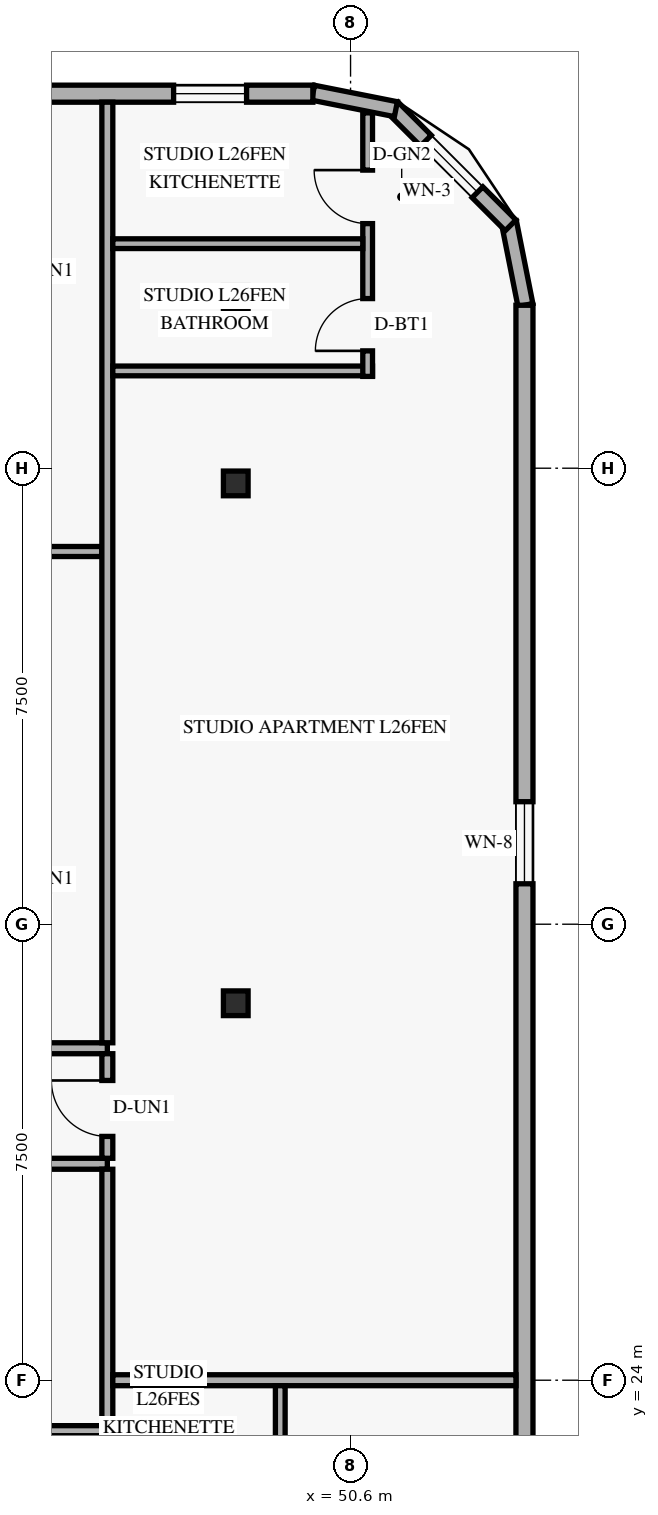
"""IFC4 building model, lengths in metres.
Left out: names, types, materials, properties, quantities, classifications, styles, units other than length and angle.
Written with IfcOpenShell. Run it as: python <this file> out.ifc"""

import sys

from ifc_helpers import new_model, si_unit, direction, frame, frame_2d, origin, origin_2d, place, context, subcontext, project, spatial, rectangle, hollow_rectangle, extrude, element, fill, save


model = new_model("IFC4")
c1 = context("Model", 3, precision=1e-05, world=origin(), true_north=direction((0.0, 1.0)))
c2 = subcontext(c1, "Body", "Model", "MODEL_VIEW")
j1 = project(units=[si_unit("LENGTHUNIT", "METRE"), si_unit("PLANEANGLEUNIT", "RADIAN")], contexts=[c1])
p1 = place(None, origin())
s1 = spatial("IfcSite", under=j1, at=p1, CompositionType="ELEMENT")
p2 = place(p1, origin())
s2 = spatial("IfcBuilding", under=s1, at=p2, CompositionType="ELEMENT")
p3 = place(p2, frame((0.0, 0.0, 102.6)))
s3 = spatial("IfcBuildingStorey", under=s2, at=p3, CompositionType="ELEMENT", Elevation=102.6)
for number, where, z_axis, x_axis in (
    (1, (48.608, 30.2, 0.0), (0.058, 0.0, 0.998), (0.0, 1.0, 0.0)),
    (2, (48.608, 38.75, 0.0), (0.058, 0.0, 0.998), (0.0, 1.0, 0.0)),
    (3, (48.608, 41.8, 0.0), (0.058, 0.0, 0.998), (0.0, 1.0, 0.0)),
):
    element("IfcColumn", number, at=place(p3, frame(where, z_axis=z_axis, x_axis=x_axis)), inside=s3, PredefinedType="COLUMN", context=c2, shape_type="SweptSolid", body=[
        extrude(hollow_rectangle(XDim=0.406, YDim=0.406, WallThickness=0.016, at=origin_2d()), origin(), (0.0, 0.0, 1.0), 3.606),
    ])
p4 = place(p3, frame((53.476, 41.684, 0.0), z_axis=(0.0, 0.0, 1.0), x_axis=(-0.195000137217, 0.980803214965, 0.0)))
e4 = element("IfcWall", 4, at=p4, inside=s3, PredefinedType="SOLIDWALL", context=c2, shape_type="SweptSolid", body=[
    extrude(rectangle(XDim=1.388, YDim=0.25, at=frame_2d((0.694, 0.0))), origin(), (0.0, 0.0, 1.0), 3.36),
])
p5 = place(p3, frame((53.232, 42.995, 0.0), z_axis=(0.0, 0.0, 1.0), x_axis=(-0.707151344399, 0.707062215165, 0.0)))
e5 = element("IfcWall", 5, at=p5, inside=s3, PredefinedType="SOLIDWALL", context=c2, shape_type="SweptSolid", body=[
    extrude(rectangle(XDim=2.739, YDim=0.25, at=frame_2d((1.37, 0.0))), origin(), (0.0, 0.0, 1.0), 3.36),
])
p6 = place(p5, frame((0.77, 0.0, 0.85)))
e6 = element("IfcOpeningElement", 6, at=p6, cuts=e5, PredefinedType="OPENING", context=c2, shape_type="SweptSolid", body=[
    extrude(rectangle(XDim=1.2, YDim=1.5, at=frame_2d((0.6, 0.75))), frame((0.0, 0.135, 0.0), z_axis=(0.0, -1.0, 0.0), x_axis=(1.0, 0.0, 0.0)), (0.0, 0.0, 1.0), 0.27),
])
p7 = place(p3, frame((51.345, 44.905, 0.0), z_axis=(0.0, 0.0, 1.0), x_axis=(-0.980809899341, 0.19496651342, 0.0)))
e7 = element("IfcWall", 7, at=p7, inside=s3, PredefinedType="SOLIDWALL", context=c2, shape_type="SweptSolid", body=[
    extrude(rectangle(XDim=1.389, YDim=0.25, at=frame_2d((0.694, 0.0))), origin(), (0.0, 0.0, 1.0), 3.36),
])
p8 = place(p3, frame((53.46, 6.32, 0.0), z_axis=(0.0, 0.0, 1.0), x_axis=(0.0, 1.0, 0.0)))
e8 = element("IfcWall", 8, at=p8, inside=s3, PredefinedType="SOLIDWALL", context=c2, shape_type="SweptSolid", body=[
    extrude(rectangle(XDim=35.36, YDim=0.28, at=frame_2d((17.68, 0.0))), origin(), (0.0, 0.0, 1.0), 3.36),
])
p9 = place(p8, frame((8.165, 0.0, 0.85)))
e9 = element("IfcOpeningElement", 9, at=p9, cuts=e8, PredefinedType="OPENING", context=c2, shape_type="SweptSolid", body=[
    extrude(rectangle(XDim=1.35, YDim=1.55, at=frame_2d((0.675, 0.775))), frame((0.0, 0.15, 0.0), z_axis=(0.0, -1.0, 0.0), x_axis=(1.0, 0.0, 0.0)), (0.0, 0.0, 1.0), 0.3),
])
p10 = place(p8, frame((25.845, 0.0, 0.85)))
e10 = element("IfcOpeningElement", 10, at=p10, cuts=e8, PredefinedType="OPENING", context=c2, shape_type="SweptSolid", body=[
    extrude(rectangle(XDim=1.35, YDim=1.55, at=frame_2d((0.675, 0.775))), frame((0.0, 0.15, 0.0), z_axis=(0.0, -1.0, 0.0), x_axis=(1.0, 0.0, 0.0)), (0.0, 0.0, 1.0), 0.3),
])
p11 = place(p3, frame((49.98, 45.16, 0.0), z_axis=(0.0, 0.0, 1.0), x_axis=(-1.0, 0.0, 0.0)))
e11 = element("IfcWall", 11, at=p11, inside=s3, PredefinedType="SOLIDWALL", context=c2, shape_type="SweptSolid", body=[
    extrude(rectangle(XDim=36.56, YDim=0.28, at=frame_2d((18.28, 0.0))), origin(), (0.0, 0.0, 1.0), 3.36),
])
p12 = place(p11, frame((31.845, 0.0, 0.85)))
e12 = element("IfcOpeningElement", 12, at=p12, cuts=e11, PredefinedType="OPENING", context=c2, shape_type="SweptSolid", body=[
    extrude(rectangle(XDim=1.2, YDim=1.5, at=frame_2d((0.6, 0.75))), frame((0.0, 0.15, 0.0), z_axis=(0.0, -1.0, 0.0), x_axis=(1.0, 0.0, 0.0)), (0.0, 0.0, 1.0), 0.3),
])
p13 = place(p11, frame((23.78, 0.0, 0.85)))
e13 = element("IfcOpeningElement", 13, at=p13, cuts=e11, PredefinedType="OPENING", context=c2, shape_type="SweptSolid", body=[
    extrude(rectangle(XDim=1.2, YDim=1.5, at=frame_2d((0.6, 0.75))), frame((0.0, 0.15, 0.0), z_axis=(0.0, -1.0, 0.0), x_axis=(1.0, 0.0, 0.0)), (0.0, 0.0, 1.0), 0.3),
])
p14 = place(p11, frame((16.895, 0.0, 0.85)))
e14 = element("IfcOpeningElement", 14, at=p14, cuts=e11, PredefinedType="OPENING", context=c2, shape_type="SweptSolid", body=[
    extrude(rectangle(XDim=1.2, YDim=1.5, at=frame_2d((0.6, 0.75))), frame((0.0, 0.15, 0.0), z_axis=(0.0, -1.0, 0.0), x_axis=(1.0, 0.0, 0.0)), (0.0, 0.0, 1.0), 0.3),
])
p15 = place(p11, frame((10.865, 0.0, 0.85)))
e15 = element("IfcOpeningElement", 15, at=p15, cuts=e11, PredefinedType="OPENING", context=c2, shape_type="SweptSolid", body=[
    extrude(rectangle(XDim=1.2, YDim=1.5, at=frame_2d((0.6, 0.75))), frame((0.0, 0.15, 0.0), z_axis=(0.0, -1.0, 0.0), x_axis=(1.0, 0.0, 0.0)), (0.0, 0.0, 1.0), 0.3),
])
p16 = place(p11, frame((5.275, 0.0, 0.85)))
e16 = element("IfcOpeningElement", 16, at=p16, cuts=e11, PredefinedType="OPENING", context=c2, shape_type="SweptSolid", body=[
    extrude(rectangle(XDim=1.2, YDim=1.5, at=frame_2d((0.6, 0.75))), frame((0.0, 0.15, 0.0), z_axis=(0.0, -1.0, 0.0), x_axis=(1.0, 0.0, 0.0)), (0.0, 0.0, 1.0), 0.3),
])
p17 = place(p11, frame((1.09, 0.0, 0.85)))
e17 = element("IfcOpeningElement", 17, at=p17, cuts=e11, PredefinedType="OPENING", context=c2, shape_type="SweptSolid", body=[
    extrude(rectangle(XDim=1.2, YDim=1.5, at=frame_2d((0.6, 0.75))), frame((0.0, 0.15, 0.0), z_axis=(0.0, -1.0, 0.0), x_axis=(1.0, 0.0, 0.0)), (0.0, 0.0, 1.0), 0.3),
])
p18 = place(p3, frame((37.64, 27.56, 0.0), z_axis=(0.0, 0.0, 1.0), x_axis=(1.0, 0.0, 0.0)))
e18 = element("IfcWall", 18, at=p18, inside=s3, PredefinedType="STANDARD", context=c2, shape_type="SweptSolid", body=[
    extrude(rectangle(XDim=8.96, YDim=0.18, at=frame_2d((4.48, 0.0))), origin(), (0.0, 0.0, 1.0), 2.731),
])
p19 = place(p3, frame((35.51, 29.46, 0.0), z_axis=(0.0, 0.0, 1.0), x_axis=(1.0, 0.0, 0.0)))
e19 = element("IfcWall", 19, at=p19, inside=s3, PredefinedType="STANDARD", context=c2, shape_type="SweptSolid", body=[
    extrude(rectangle(XDim=11.09, YDim=0.18, at=frame_2d((5.545, 0.0))), origin(), (0.0, 0.0, 1.0), 2.731),
])
p20 = place(p19, frame((0.32, 0.0, 0.0)))
e20 = element("IfcOpeningElement", 20, at=p20, cuts=e19, PredefinedType="OPENING", context=c2, shape_type="SweptSolid", body=[
    extrude(rectangle(XDim=0.92, YDim=2.15, at=frame_2d((0.46, 1.075))), frame((0.0, 0.1, 0.0), z_axis=(0.0, -1.0, 0.0), x_axis=(1.0, 0.0, 0.0)), (0.0, 0.0, 1.0), 0.2),
])
p21 = place(p3, frame((41.69, 37.63, 0.0), z_axis=(0.0, 0.0, 1.0), x_axis=(1.0, 0.0, 0.0)))
e21 = element("IfcWall", 21, at=p21, inside=s3, PredefinedType="PARTITIONING", context=c2, shape_type="SweptSolid", body=[
    extrude(rectangle(XDim=4.82, YDim=0.165, at=frame_2d((2.41, 0.0))), origin(), (0.0, 0.0, 1.0), 2.731),
])
p22 = place(p3, frame((42.83, 23.17, 0.0), z_axis=(0.0, 0.0, 1.0), x_axis=(1.0, 0.0, 0.0)))
e22 = element("IfcWall", 22, at=p22, inside=s3, PredefinedType="PARTITIONING", context=c2, shape_type="SweptSolid", body=[
    extrude(rectangle(XDim=4.13, YDim=0.165, at=frame_2d((2.065, 0.0))), origin(), (0.0, 0.0, 1.0), 2.731),
])
p23 = place(p22, frame((0.55, 0.0, 0.0)))
e23 = element("IfcOpeningElement", 23, at=p23, cuts=e22, PredefinedType="OPENING", context=c2, shape_type="SweptSolid", body=[
    extrude(rectangle(XDim=0.88, YDim=2.12, at=frame_2d((0.44, 1.06))), frame((0.0, 0.093, 0.0), z_axis=(0.0, -1.0, 0.0), x_axis=(1.0, 0.0, 0.0)), (0.0, 0.0, 1.0), 0.185),
])
p24 = place(p3, frame((46.6, 27.65, 0.0), z_axis=(0.0, 0.0, 1.0), x_axis=(0.0, 1.0, 0.0)))
e24 = element("IfcWall", 24, at=p24, inside=s3, PredefinedType="STANDARD", context=c2, shape_type="SweptSolid", body=[
    extrude(rectangle(XDim=1.72, YDim=0.18, at=frame_2d((0.86, 0.0))), origin(), (0.0, 0.0, 1.0), 3.36),
])
p25 = place(p24, frame((0.36, 0.0, 0.0)))
e25 = element("IfcOpeningElement", 25, at=p25, cuts=e24, PredefinedType="OPENING", context=c2, shape_type="SweptSolid", body=[
    extrude(rectangle(XDim=0.92, YDim=2.15, at=frame_2d((0.46, 1.075))), frame((0.0, 0.1, 0.0), z_axis=(0.0, -1.0, 0.0), x_axis=(1.0, 0.0, 0.0)), (0.0, 0.0, 1.0), 0.2),
])
p26 = place(p3, frame((46.6, 17.37, 0.0), z_axis=(0.0, 0.0, 1.0), x_axis=(0.0, 1.0, 0.0)))
e26 = element("IfcWall", 26, at=p26, inside=s3, PredefinedType="PARTITIONING", context=c2, shape_type="SweptSolid", body=[
    extrude(rectangle(XDim=10.1, YDim=0.18, at=frame_2d((5.05, 0.0))), origin(), (0.0, 0.0, 1.0), 2.731),
])
p27 = place(p3, frame((46.6, 29.55, 0.0), z_axis=(0.0, 0.0, 1.0), x_axis=(0.0, 1.0, 0.0)))
e27 = element("IfcWall", 27, at=p27, inside=s3, PredefinedType="PARTITIONING", context=c2, shape_type="SweptSolid", body=[
    extrude(rectangle(XDim=15.47, YDim=0.18, at=frame_2d((7.735, 0.0))), origin(), (0.0, 0.0, 1.0), 2.731),
])
p28 = place(p3, frame((46.69, 24.0, 0.0), z_axis=(0.0, 0.0, 1.0), x_axis=(1.0, 0.0, 0.0)))
e28 = element("IfcWall", 28, at=p28, inside=s3, PredefinedType="PARTITIONING", context=c2, shape_type="SweptSolid", body=[
    extrude(rectangle(XDim=6.63, YDim=0.18, at=frame_2d((3.315, 0.0))), origin(), (0.0, 0.0, 1.0), 2.809),
])
p29 = place(p3, frame((49.444, 19.27, 0.0), z_axis=(0.0, 0.0, 1.0), x_axis=(0.0, 1.0, 0.0)))
e29 = element("IfcWall", 29, at=p29, inside=s3, PredefinedType="PLUMBINGWALL", context=c2, shape_type="SweptSolid", body=[
    extrude(rectangle(XDim=4.64, YDim=0.16, at=frame_2d((2.32, 0.0))), origin(), (0.0, 0.0, 1.0), 3.36),
])
p30 = place(p29, frame((0.42, 0.0, 0.0)))
e30 = element("IfcOpeningElement", 30, at=p30, cuts=e29, PredefinedType="OPENING", context=c2, shape_type="SweptSolid", body=[
    extrude(rectangle(XDim=0.86, YDim=2.12, at=frame_2d((0.43, 1.06))), frame((0.0, 0.09, 0.0), z_axis=(0.0, -1.0, 0.0), x_axis=(1.0, 0.0, 0.0)), (0.0, 0.0, 1.0), 0.18),
])
p31 = place(p29, frame((2.513, 0.0, 0.0)))
e31 = element("IfcOpeningElement", 31, at=p31, cuts=e29, PredefinedType="OPENING", context=c2, shape_type="SweptSolid", body=[
    extrude(rectangle(XDim=0.88, YDim=2.12, at=frame_2d((0.44, 1.06))), frame((0.0, 0.09, 0.0), z_axis=(0.0, -1.0, 0.0), x_axis=(1.0, 0.0, 0.0)), (0.0, 0.0, 1.0), 0.18),
])
p32 = place(p3, frame((46.69, 40.6, 0.0), z_axis=(0.0, 0.0, 1.0), x_axis=(1.0, 0.0, 0.0)))
e32 = element("IfcWall", 32, at=p32, inside=s3, PredefinedType="PLUMBINGWALL", context=c2, shape_type="SweptSolid", body=[
    extrude(rectangle(XDim=4.271, YDim=0.16, at=frame_2d((2.136, 0.0))), origin(), (0.0, 0.0, 1.0), 2.809),
])
p33 = place(p3, frame((50.881, 40.51, 0.0), z_axis=(0.0, 0.0, 1.0), x_axis=(0.0, 1.0, 0.0)))
e33 = element("IfcWall", 33, at=p33, inside=s3, PredefinedType="PLUMBINGWALL", context=c2, shape_type="SweptSolid", body=[
    extrude(rectangle(XDim=4.334, YDim=0.16, at=frame_2d((2.167, 0.0))), origin(), (0.0, 0.0, 1.0), 3.36),
])
p34 = place(p33, frame((0.42, 0.0, 0.0)))
e34 = element("IfcOpeningElement", 34, at=p34, cuts=e33, PredefinedType="OPENING", context=c2, shape_type="SweptSolid", body=[
    extrude(rectangle(XDim=0.86, YDim=2.12, at=frame_2d((0.43, 1.06))), frame((0.0, 0.09, 0.0), z_axis=(0.0, -1.0, 0.0), x_axis=(1.0, 0.0, 0.0)), (0.0, 0.0, 1.0), 0.18),
])
p35 = place(p33, frame((2.513, 0.0, 0.0)))
e35 = element("IfcOpeningElement", 35, at=p35, cuts=e33, PredefinedType="OPENING", context=c2, shape_type="SweptSolid", body=[
    extrude(rectangle(XDim=0.88, YDim=2.12, at=frame_2d((0.44, 1.06))), frame((0.0, 0.09, 0.0), z_axis=(0.0, -1.0, 0.0), x_axis=(1.0, 0.0, 0.0)), (0.0, 0.0, 1.0), 0.18),
])
p36 = place(p3, frame((46.69, 42.693, 0.0), z_axis=(0.0, 0.0, 1.0), x_axis=(1.0, 0.0, 0.0)))
e36 = element("IfcWall", 36, at=p36, inside=s3, PredefinedType="PLUMBINGWALL", context=c2, shape_type="SweptSolid", body=[
    extrude(rectangle(XDim=4.111, YDim=0.16, at=frame_2d((2.056, 0.0))), origin(), (0.0, 0.0, 1.0), 3.36),
])
p37 = place(p6, origin())
e37 = element("IfcWindow", 37, at=p37, inside=s3, PartitioningType="SINGLE_PANEL", PredefinedType="WINDOW", context=c2, shape_type="SweptSolid", body=[
    extrude(rectangle(XDim=1.2, YDim=1.5, at=frame_2d((0.6, 0.75))), frame((0.0, 0.03, 0.0), z_axis=(0.0, -1.0, 0.0), x_axis=(1.0, 0.0, 0.0)), (0.0, 0.0, 1.0), 0.06),
])
fill(e6, e37)
p38 = place(p10, origin())
e38 = element("IfcWindow", 38, at=p38, inside=s3, PartitioningType="SINGLE_PANEL", PredefinedType="WINDOW", context=c2, shape_type="SweptSolid", body=[
    extrude(rectangle(XDim=1.35, YDim=1.55, at=frame_2d((0.675, 0.775))), frame((0.0, 0.03, 0.0), z_axis=(0.0, -1.0, 0.0), x_axis=(1.0, 0.0, 0.0)), (0.0, 0.0, 1.0), 0.06),
])
fill(e10, e38)
p39 = place(p17, origin())
e39 = element("IfcWindow", 39, at=p39, inside=s3, PartitioningType="SINGLE_PANEL", PredefinedType="WINDOW", context=c2, shape_type="SweptSolid", body=[
    extrude(rectangle(XDim=1.2, YDim=1.5, at=frame_2d((0.6, 0.75))), frame((0.0, 0.03, 0.0), z_axis=(0.0, -1.0, 0.0), x_axis=(1.0, 0.0, 0.0)), (0.0, 0.0, 1.0), 0.06),
])
fill(e17, e39)
p40 = place(p25, origin())
e40 = element("IfcDoor", 40, at=p40, inside=s3, OperationType="SINGLE_SWING_RIGHT", PredefinedType="DOOR", context=c2, shape_type="SweptSolid", body=[
    extrude(rectangle(XDim=0.92, YDim=2.15, at=frame_2d((0.46, 1.075))), frame((0.0, 0.025, 0.0), z_axis=(0.0, -1.0, 0.0), x_axis=(1.0, 0.0, 0.0)), (0.0, 0.0, 1.0), 0.05),
])
fill(e25, e40)
p41 = place(p34, origin())
e41 = element("IfcDoor", 41, at=p41, inside=s3, OperationType="SINGLE_SWING_LEFT", PredefinedType="DOOR", context=c2, shape_type="SweptSolid", body=[
    extrude(rectangle(XDim=0.86, YDim=2.12, at=frame_2d((0.43, 1.06))), frame((0.0, 0.025, 0.0), z_axis=(0.0, -1.0, 0.0), x_axis=(1.0, 0.0, 0.0)), (0.0, 0.0, 1.0), 0.05),
])
fill(e34, e41)
p42 = place(p35, origin())
e42 = element("IfcDoor", 42, at=p42, inside=s3, OperationType="SINGLE_SWING_RIGHT", PredefinedType="DOOR", context=c2, shape_type="SweptSolid", body=[
    extrude(rectangle(XDim=0.88, YDim=2.12, at=frame_2d((0.44, 1.06))), frame((0.0, 0.025, 0.0), z_axis=(0.0, -1.0, 0.0), x_axis=(1.0, 0.0, 0.0)), (0.0, 0.0, 1.0), 0.05),
])
fill(e35, e42)
save(model, sys.argv[1])
